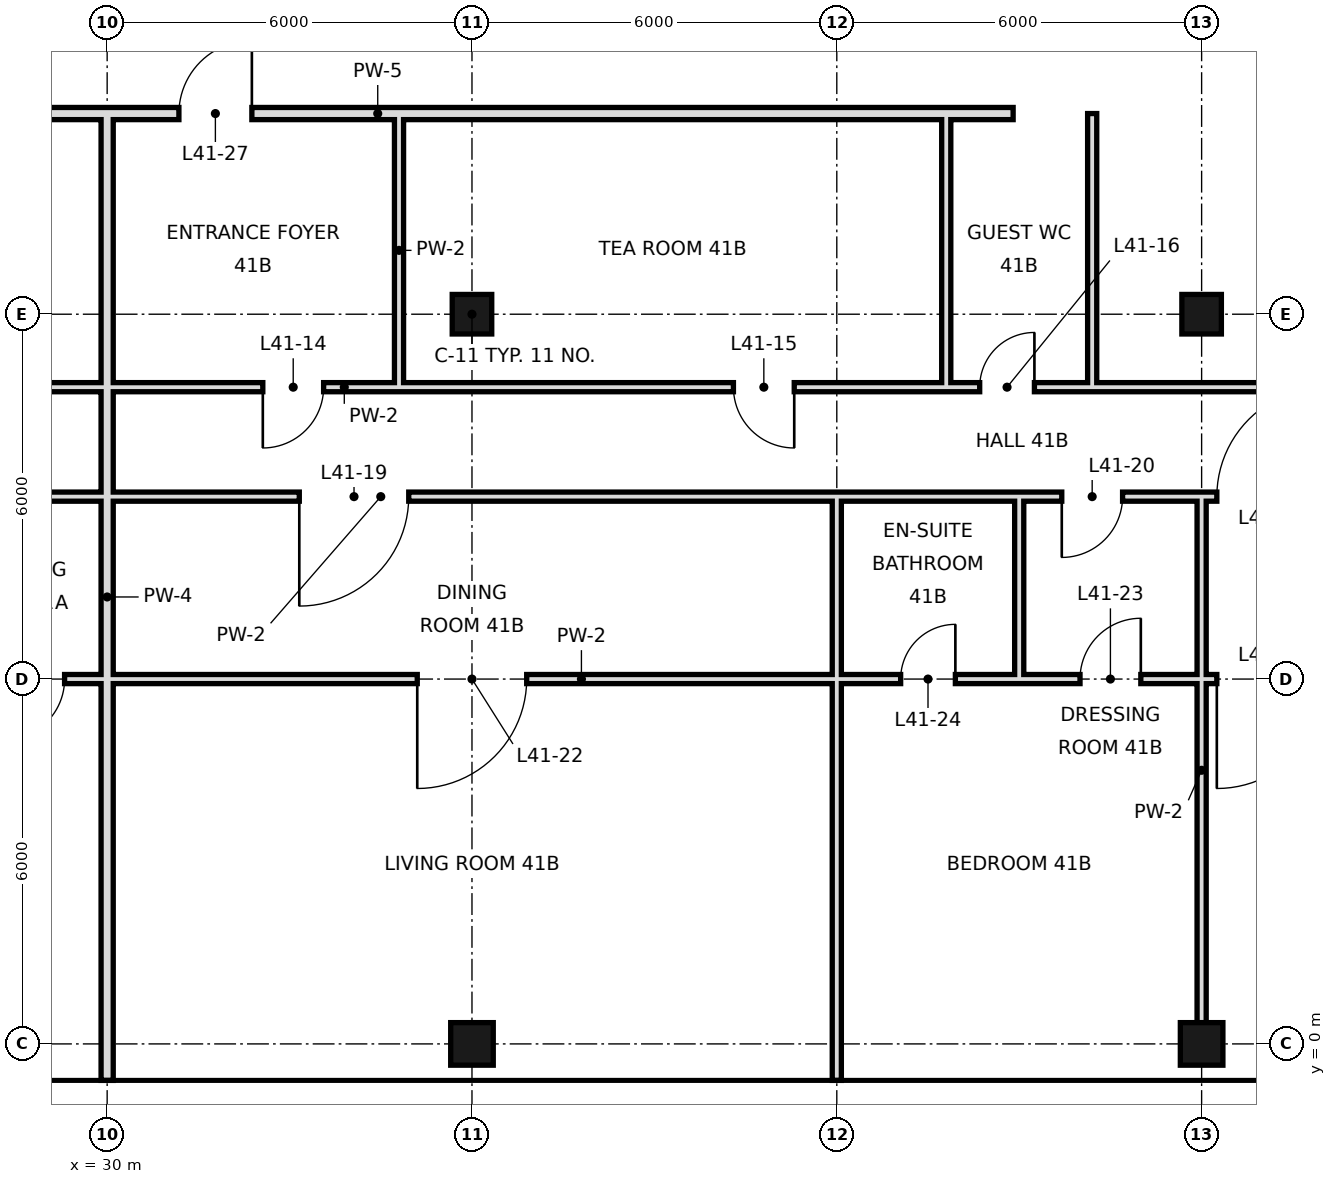
"""IFC4 building model, lengths in metres.
Left out: names, types, materials, properties, quantities, classifications, styles, units other than length and angle.
Written with IfcOpenShell. Run it as: python <this file> out.ifc"""

import sys

from ifc_helpers import new_model, si_unit, direction, frame, frame_2d, origin, origin_2d, place, context, subcontext, project, spatial, rectangle, hollow_rectangle, extrude, element, fill, save


model = new_model("IFC4")
c1 = context("Model", 3, precision=1e-05, world=origin(), true_north=direction((0.0, 1.0)))
c2 = subcontext(c1, "Body", "Model", "MODEL_VIEW")
j1 = project(units=[si_unit("LENGTHUNIT", "METRE"), si_unit("PLANEANGLEUNIT", "RADIAN")], contexts=[c1])
p1 = place(None, origin())
s1 = spatial("IfcSite", under=j1, at=p1, CompositionType="ELEMENT")
p2 = place(p1, origin())
s2 = spatial("IfcBuilding", under=s1, at=p2, CompositionType="ELEMENT")
p3 = place(p2, frame((0.0, 0.0, 178.0)))
s3 = spatial("IfcBuildingStorey", under=s2, at=p3, CompositionType="ELEMENT", Elevation=178.0)
p4 = place(p3, frame((36.0, 0.0, 0.0), z_axis=(0.0, 0.0, 1.0), x_axis=(1.0, 0.0, 0.0)))
e1 = element("IfcColumn", 1, at=p4, inside=s3, PredefinedType="COLUMN", context=c2, shape_type="SweptSolid", body=[
    extrude(hollow_rectangle(XDim=0.7, YDim=0.7, WallThickness=0.036, at=origin_2d()), origin(), (0.0, 0.0, 1.0), 3.6),
])
p5 = place(p3, frame((36.0, 12.0, 0.0), z_axis=(0.0, 0.0, 1.0), x_axis=(1.0, 0.0, 0.0)))
e2 = element("IfcColumn", 2, at=p5, inside=s3, PredefinedType="COLUMN", context=c2, shape_type="SweptSolid", body=[
    extrude(hollow_rectangle(XDim=0.65, YDim=0.65, WallThickness=0.032, at=origin_2d()), origin(), (0.0, 0.0, 1.0), 3.6),
])
p6 = place(p3, frame((48.0, 0.0, 0.0), z_axis=(0.0, 0.0, 1.0), x_axis=(1.0, 0.0, 0.0)))
e3 = element("IfcColumn", 3, at=p6, inside=s3, PredefinedType="COLUMN", context=c2, shape_type="SweptSolid", body=[
    extrude(hollow_rectangle(XDim=0.7, YDim=0.7, WallThickness=0.036, at=origin_2d()), origin(), (0.0, 0.0, 1.0), 3.6),
])
p7 = place(p3, frame((48.0, 12.0, 0.0), z_axis=(0.0, 0.0, 1.0), x_axis=(1.0, 0.0, 0.0)))
e4 = element("IfcColumn", 4, at=p7, inside=s3, PredefinedType="COLUMN", context=c2, shape_type="SweptSolid", body=[
    extrude(hollow_rectangle(XDim=0.65, YDim=0.65, WallThickness=0.032, at=origin_2d()), origin(), (0.0, 0.0, 1.0), 3.6),
])
p8 = place(p3, frame((30.0, -0.6, 0.0), z_axis=(0.0, 0.0, 1.0), x_axis=(0.0, 1.0, 0.0)))
e5 = element("IfcWall", 5, at=p8, inside=s3, PredefinedType="SOLIDWALL", context=c2, shape_type="SweptSolid", body=[
    extrude(rectangle(XDim=15.9, YDim=0.2, at=frame_2d((7.95, 0.0))), origin(), (0.0, 0.0, 1.0), 2.72),
])
p9 = place(p3, frame((34.8, 10.8, 0.0), z_axis=(0.0, 0.0, 1.0), x_axis=(0.0, 1.0, 0.0)))
e6 = element("IfcWall", 6, at=p9, inside=s3, PredefinedType="PARTITIONING", context=c2, shape_type="SweptSolid", body=[
    extrude(rectangle(XDim=4.5, YDim=0.15, at=frame_2d((2.25, 0.0))), origin(), (0.0, 0.0, 1.0), 3.42),
])
p10 = place(p3, frame((42.0, -0.6, 0.0), z_axis=(0.0, 0.0, 1.0), x_axis=(0.0, 1.0, 0.0)))
e7 = element("IfcWall", 7, at=p10, inside=s3, PredefinedType="PARTITIONING", context=c2, shape_type="SweptSolid", body=[
    extrude(rectangle(XDim=6.6, YDim=0.15, at=frame_2d((3.3, 0.0))), origin(), (0.0, 0.0, 1.0), 2.72),
])
p11 = place(p3, frame((42.0, 6.0, 0.0), z_axis=(0.0, 0.0, 1.0), x_axis=(0.0, 1.0, 0.0)))
e8 = element("IfcWall", 8, at=p11, inside=s3, PredefinedType="PARTITIONING", context=c2, shape_type="SweptSolid", body=[
    extrude(rectangle(XDim=3.0, YDim=0.15, at=frame_2d((1.5, 0.0))), origin(), (0.0, 0.0, 1.0), 2.72),
])
p12 = place(p3, frame((43.8, 10.8, 0.0), z_axis=(0.0, 0.0, 1.0), x_axis=(0.0, 1.0, 0.0)))
e9 = element("IfcWall", 9, at=p12, inside=s3, PredefinedType="PARTITIONING", context=c2, shape_type="SweptSolid", body=[
    extrude(rectangle(XDim=4.5, YDim=0.15, at=frame_2d((2.25, 0.0))), origin(), (0.0, 0.0, 1.0), 3.42),
])
p13 = place(p3, frame((45.0, 6.0, 0.0), z_axis=(0.0, 0.0, 1.0), x_axis=(0.0, 1.0, 0.0)))
e10 = element("IfcWall", 10, at=p13, inside=s3, PredefinedType="PARTITIONING", context=c2, shape_type="SweptSolid", body=[
    extrude(rectangle(XDim=3.0, YDim=0.15, at=frame_2d((1.5, 0.0))), origin(), (0.0, 0.0, 1.0), 3.42),
])
p14 = place(p3, frame((46.2, 10.8, 0.0), z_axis=(0.0, 0.0, 1.0), x_axis=(0.0, 1.0, 0.0)))
e11 = element("IfcWall", 11, at=p14, inside=s3, PredefinedType="PARTITIONING", context=c2, shape_type="SweptSolid", body=[
    extrude(rectangle(XDim=4.5, YDim=0.15, at=frame_2d((2.25, 0.0))), origin(), (0.0, 0.0, 1.0), 3.42),
])
p15 = place(p3, frame((48.0, 0.0, 0.0), z_axis=(0.0, 0.0, 1.0), x_axis=(0.0, 1.0, 0.0)))
e12 = element("IfcWall", 12, at=p15, inside=s3, PredefinedType="PARTITIONING", context=c2, shape_type="SweptSolid", body=[
    extrude(rectangle(XDim=9.0, YDim=0.15, at=frame_2d((4.5, 0.0))), origin(), (0.0, 0.0, 1.0), 2.72),
])
p16 = place(p3, frame((24.0, 10.8, 0.0), z_axis=(0.0, 0.0, 1.0), x_axis=(1.0, 0.0, 0.0)))
e13 = element("IfcWall", 13, at=p16, inside=s3, PredefinedType="PARTITIONING", context=c2, shape_type="SweptSolid", body=[
    extrude(rectangle(XDim=19.8, YDim=0.15, at=frame_2d((9.9, 0.0))), origin(), (0.0, 0.0, 1.0), 3.42),
])
p17 = place(p16, frame((2.5, 0.0, 0.0)))
e14 = element("IfcOpeningElement", 14, at=p17, cuts=e13, PredefinedType="OPENING", context=c2, shape_type="SweptSolid", body=[
    extrude(rectangle(XDim=1.0, YDim=2.4, at=frame_2d((0.5, 1.2))), frame((0.0, 0.085, 0.0), z_axis=(0.0, -1.0, 0.0), x_axis=(1.0, 0.0, 0.0)), (0.0, 0.0, 1.0), 0.17),
])
p18 = place(p16, frame((8.56, 0.0, 0.0)))
e15 = element("IfcOpeningElement", 15, at=p18, cuts=e13, PredefinedType="OPENING", context=c2, shape_type="SweptSolid", body=[
    extrude(rectangle(XDim=1.0, YDim=2.4, at=frame_2d((0.5, 1.2))), frame((0.0, 0.085, 0.0), z_axis=(0.0, -1.0, 0.0), x_axis=(1.0, 0.0, 0.0)), (0.0, 0.0, 1.0), 0.17),
])
p19 = place(p16, frame((16.3, 0.0, 0.0)))
e16 = element("IfcOpeningElement", 16, at=p19, cuts=e13, PredefinedType="OPENING", context=c2, shape_type="SweptSolid", body=[
    extrude(rectangle(XDim=1.0, YDim=2.4, at=frame_2d((0.5, 1.2))), frame((0.0, 0.085, 0.0), z_axis=(0.0, -1.0, 0.0), x_axis=(1.0, 0.0, 0.0)), (0.0, 0.0, 1.0), 0.17),
])
p20 = place(p3, frame((46.2, 10.8, 0.0), z_axis=(0.0, 0.0, 1.0), x_axis=(1.0, 0.0, 0.0)))
e17 = element("IfcWall", 17, at=p20, inside=s3, PredefinedType="PARTITIONING", context=c2, shape_type="SweptSolid", body=[
    extrude(rectangle(XDim=9.0, YDim=0.15, at=frame_2d((4.5, 0.0))), origin(), (0.0, 0.0, 1.0), 3.42),
])
p21 = place(p20, frame((5.5, 0.0, 0.0)))
e18 = element("IfcOpeningElement", 18, at=p21, cuts=e17, PredefinedType="OPENING", context=c2, shape_type="SweptSolid", body=[
    extrude(rectangle(XDim=1.0, YDim=2.4, at=frame_2d((0.5, 1.2))), frame((0.0, 0.085, 0.0), z_axis=(0.0, -1.0, 0.0), x_axis=(1.0, 0.0, 0.0)), (0.0, 0.0, 1.0), 0.17),
])
p22 = place(p3, frame((43.8, 10.8, 0.0), z_axis=(0.0, 0.0, 1.0), x_axis=(1.0, 0.0, 0.0)))
e19 = element("IfcWall", 19, at=p22, inside=s3, PredefinedType="PARTITIONING", context=c2, shape_type="SweptSolid", body=[
    extrude(rectangle(XDim=2.4, YDim=0.15, at=frame_2d((1.2, 0.0))), origin(), (0.0, 0.0, 1.0), 3.42),
])
p23 = place(p22, frame((0.55, 0.0, 0.0)))
e20 = element("IfcOpeningElement", 20, at=p23, cuts=e19, PredefinedType="OPENING", context=c2, shape_type="SweptSolid", body=[
    extrude(rectangle(XDim=0.9, YDim=2.4, at=frame_2d((0.45, 1.2))), frame((0.0, 0.085, 0.0), z_axis=(0.0, -1.0, 0.0), x_axis=(1.0, 0.0, 0.0)), (0.0, 0.0, 1.0), 0.17),
])
p24 = place(p3, frame((24.0, 15.3, 0.0), z_axis=(0.0, 0.0, 1.0), x_axis=(1.0, 0.0, 0.0)))
e21 = element("IfcWall", 21, at=p24, inside=s3, PredefinedType="SOLIDWALL", context=c2, shape_type="SweptSolid", body=[
    extrude(rectangle(XDim=20.9, YDim=0.2, at=frame_2d((10.45, 0.0))), origin(), (0.0, 0.0, 1.0), 2.72),
])
p25 = place(p24, frame((3.26, 0.0, 0.0)))
e22 = element("IfcOpeningElement", 22, at=p25, cuts=e21, PredefinedType="OPENING", context=c2, shape_type="SweptSolid", body=[
    extrude(rectangle(XDim=1.2, YDim=2.4, at=frame_2d((0.6, 1.2))), frame((0.0, 0.11, 0.0), z_axis=(0.0, -1.0, 0.0), x_axis=(1.0, 0.0, 0.0)), (0.0, 0.0, 1.0), 0.22),
])
p26 = place(p24, frame((7.18, 0.0, 0.0)))
e23 = element("IfcOpeningElement", 23, at=p26, cuts=e21, PredefinedType="OPENING", context=c2, shape_type="SweptSolid", body=[
    extrude(rectangle(XDim=1.2, YDim=2.4, at=frame_2d((0.6, 1.2))), frame((0.0, 0.11, 0.0), z_axis=(0.0, -1.0, 0.0), x_axis=(1.0, 0.0, 0.0)), (0.0, 0.0, 1.0), 0.22),
])
p27 = place(p3, frame((27.0, 6.0, 0.0), z_axis=(0.0, 0.0, 1.0), x_axis=(1.0, 0.0, 0.0)))
e24 = element("IfcWall", 24, at=p27, inside=s3, PredefinedType="PARTITIONING", context=c2, shape_type="SweptSolid", body=[
    extrude(rectangle(XDim=15.0, YDim=0.15, at=frame_2d((7.5, 0.0))), origin(), (0.0, 0.0, 1.0), 2.97),
])
p28 = place(p27, frame((1.3, 0.0, 0.0)))
e25 = element("IfcOpeningElement", 25, at=p28, cuts=e24, PredefinedType="OPENING", context=c2, shape_type="SweptSolid", body=[
    extrude(rectangle(XDim=1.0, YDim=2.4, at=frame_2d((0.5, 1.2))), frame((0.0, 0.085, 0.0), z_axis=(0.0, -1.0, 0.0), x_axis=(1.0, 0.0, 0.0)), (0.0, 0.0, 1.0), 0.17),
])
p29 = place(p27, frame((8.1, 0.0, 0.0)))
e26 = element("IfcOpeningElement", 26, at=p29, cuts=e24, PredefinedType="OPENING", context=c2, shape_type="SweptSolid", body=[
    extrude(rectangle(XDim=1.8, YDim=2.4, at=frame_2d((0.9, 1.2))), frame((0.0, 0.085, 0.0), z_axis=(0.0, -1.0, 0.0), x_axis=(1.0, 0.0, 0.0)), (0.0, 0.0, 1.0), 0.17),
])
p30 = place(p3, frame((45.0, 6.0, 0.0), z_axis=(0.0, 0.0, 1.0), x_axis=(1.0, 0.0, 0.0)))
e27 = element("IfcWall", 27, at=p30, inside=s3, PredefinedType="PARTITIONING", context=c2, shape_type="SweptSolid", body=[
    extrude(rectangle(XDim=15.0, YDim=0.15, at=frame_2d((7.5, 0.0))), origin(), (0.0, 0.0, 1.0), 2.72),
])
p31 = place(p30, frame((1.0, 0.0, 0.0)))
e28 = element("IfcOpeningElement", 28, at=p31, cuts=e27, PredefinedType="OPENING", context=c2, shape_type="SweptSolid", body=[
    extrude(rectangle(XDim=1.0, YDim=2.4, at=frame_2d((0.5, 1.2))), frame((0.0, 0.085, 0.0), z_axis=(0.0, -1.0, 0.0), x_axis=(1.0, 0.0, 0.0)), (0.0, 0.0, 1.0), 0.17),
])
p32 = place(p30, frame((3.25, 0.0, 0.0)))
e29 = element("IfcOpeningElement", 29, at=p32, cuts=e27, PredefinedType="OPENING", context=c2, shape_type="SweptSolid", body=[
    extrude(rectangle(XDim=1.8, YDim=2.4, at=frame_2d((0.9, 1.2))), frame((0.0, 0.085, 0.0), z_axis=(0.0, -1.0, 0.0), x_axis=(1.0, 0.0, 0.0)), (0.0, 0.0, 1.0), 0.17),
])
p33 = place(p3, frame((42.0, 6.0, 0.0), z_axis=(0.0, 0.0, 1.0), x_axis=(1.0, 0.0, 0.0)))
e30 = element("IfcWall", 30, at=p33, inside=s3, PredefinedType="PARTITIONING", context=c2, shape_type="SweptSolid", body=[
    extrude(rectangle(XDim=3.0, YDim=0.15, at=frame_2d((1.5, 0.0))), origin(), (0.0, 0.0, 1.0), 2.97),
])
p34 = place(p33, frame((1.05, 0.0, 0.0)))
e31 = element("IfcOpeningElement", 31, at=p34, cuts=e30, PredefinedType="OPENING", context=c2, shape_type="SweptSolid", body=[
    extrude(rectangle(XDim=0.9, YDim=2.4, at=frame_2d((0.45, 1.2))), frame((0.0, 0.085, 0.0), z_axis=(0.0, -1.0, 0.0), x_axis=(1.0, 0.0, 0.0)), (0.0, 0.0, 1.0), 0.17),
])
p35 = place(p3, frame((27.0, 9.0, 0.0), z_axis=(0.0, 0.0, 1.0), x_axis=(1.0, 0.0, 0.0)))
e32 = element("IfcWall", 32, at=p35, inside=s3, PredefinedType="PARTITIONING", context=c2, shape_type="SweptSolid", body=[
    extrude(rectangle(XDim=15.0, YDim=0.15, at=frame_2d((7.5, 0.0))), origin(), (0.0, 0.0, 1.0), 3.42),
])
p36 = place(p35, frame((1.0, 0.0, 0.0)))
e33 = element("IfcOpeningElement", 33, at=p36, cuts=e32, PredefinedType="OPENING", context=c2, shape_type="SweptSolid", body=[
    extrude(rectangle(XDim=1.0, YDim=2.4, at=frame_2d((0.5, 1.2))), frame((0.0, 0.085, 0.0), z_axis=(0.0, -1.0, 0.0), x_axis=(1.0, 0.0, 0.0)), (0.0, 0.0, 1.0), 0.17),
])
p37 = place(p35, frame((6.16, 0.0, 0.0)))
e34 = element("IfcOpeningElement", 34, at=p37, cuts=e32, PredefinedType="OPENING", context=c2, shape_type="SweptSolid", body=[
    extrude(rectangle(XDim=1.8, YDim=2.4, at=frame_2d((0.9, 1.2))), frame((0.0, 0.085, 0.0), z_axis=(0.0, -1.0, 0.0), x_axis=(1.0, 0.0, 0.0)), (0.0, 0.0, 1.0), 0.17),
])
p38 = place(p3, frame((45.0, 9.0, 0.0), z_axis=(0.0, 0.0, 1.0), x_axis=(1.0, 0.0, 0.0)))
e35 = element("IfcWall", 35, at=p38, inside=s3, PredefinedType="PARTITIONING", context=c2, shape_type="SweptSolid", body=[
    extrude(rectangle(XDim=15.6, YDim=0.15, at=frame_2d((7.8, 0.0))), origin(), (0.0, 0.0, 1.0), 3.42),
])
p39 = place(p38, frame((0.7, 0.0, 0.0)))
e36 = element("IfcOpeningElement", 36, at=p39, cuts=e35, PredefinedType="OPENING", context=c2, shape_type="SweptSolid", body=[
    extrude(rectangle(XDim=1.0, YDim=2.4, at=frame_2d((0.5, 1.2))), frame((0.0, 0.085, 0.0), z_axis=(0.0, -1.0, 0.0), x_axis=(1.0, 0.0, 0.0)), (0.0, 0.0, 1.0), 0.17),
])
p40 = place(p38, frame((3.25, 0.0, 0.0)))
e37 = element("IfcOpeningElement", 37, at=p40, cuts=e35, PredefinedType="OPENING", context=c2, shape_type="SweptSolid", body=[
    extrude(rectangle(XDim=1.8, YDim=2.4, at=frame_2d((0.9, 1.2))), frame((0.0, 0.085, 0.0), z_axis=(0.0, -1.0, 0.0), x_axis=(1.0, 0.0, 0.0)), (0.0, 0.0, 1.0), 0.17),
])
p41 = place(p3, frame((42.0, 9.0, 0.0), z_axis=(0.0, 0.0, 1.0), x_axis=(1.0, 0.0, 0.0)))
e38 = element("IfcWall", 38, at=p41, inside=s3, PredefinedType="PARTITIONING", context=c2, shape_type="SweptSolid", body=[
    extrude(rectangle(XDim=3.0, YDim=0.15, at=frame_2d((1.5, 0.0))), origin(), (0.0, 0.0, 1.0), 3.42),
])
p42 = place(p28, frame((1.0, 0.0, 0.0), z_axis=(0.0, 0.0, 1.0), x_axis=(-1.0, 0.0, 0.0)))
e39 = element("IfcDoor", 39, at=p42, inside=s3, OperationType="SINGLE_SWING_RIGHT", PredefinedType="DOOR", context=c2, shape_type="SweptSolid", body=[
    extrude(rectangle(XDim=1.0, YDim=2.4, at=frame_2d((0.5, 1.2))), frame((0.0, 0.025, 0.0), z_axis=(0.0, -1.0, 0.0), x_axis=(1.0, 0.0, 0.0)), (0.0, 0.0, 1.0), 0.05),
])
fill(e25, e39)
p43 = place(p18, frame((1.0, 0.0, 0.0), z_axis=(0.0, 0.0, 1.0), x_axis=(-1.0, 0.0, 0.0)))
e40 = element("IfcDoor", 40, at=p43, inside=s3, OperationType="SINGLE_SWING_RIGHT", PredefinedType="DOOR", context=c2, shape_type="SweptSolid", body=[
    extrude(rectangle(XDim=1.0, YDim=2.4, at=frame_2d((0.5, 1.2))), frame((0.0, 0.025, 0.0), z_axis=(0.0, -1.0, 0.0), x_axis=(1.0, 0.0, 0.0)), (0.0, 0.0, 1.0), 0.05),
])
fill(e15, e40)
p44 = place(p19, origin())
e41 = element("IfcDoor", 41, at=p44, inside=s3, OperationType="SINGLE_SWING_RIGHT", PredefinedType="DOOR", context=c2, shape_type="SweptSolid", body=[
    extrude(rectangle(XDim=1.0, YDim=2.4, at=frame_2d((0.5, 1.2))), frame((0.0, 0.025, 0.0), z_axis=(0.0, -1.0, 0.0), x_axis=(1.0, 0.0, 0.0)), (0.0, 0.0, 1.0), 0.05),
])
fill(e16, e41)
p45 = place(p23, frame((0.9, 0.0, 0.0), z_axis=(0.0, 0.0, 1.0), x_axis=(-1.0, 0.0, 0.0)))
e42 = element("IfcDoor", 42, at=p45, inside=s3, OperationType="SINGLE_SWING_LEFT", PredefinedType="DOOR", context=c2, shape_type="SweptSolid", body=[
    extrude(rectangle(XDim=0.9, YDim=2.4, at=frame_2d((0.45, 1.2))), frame((0.0, 0.025, 0.0), z_axis=(0.0, -1.0, 0.0), x_axis=(1.0, 0.0, 0.0)), (0.0, 0.0, 1.0), 0.05),
])
fill(e20, e42)
p46 = place(p37, frame((1.8, 0.0, 0.0), z_axis=(0.0, 0.0, 1.0), x_axis=(-1.0, 0.0, 0.0)))
e43 = element("IfcDoor", 43, at=p46, inside=s3, OperationType="SINGLE_SWING_RIGHT", PredefinedType="DOOR", context=c2, shape_type="SweptSolid", body=[
    extrude(rectangle(XDim=1.8, YDim=2.4, at=frame_2d((0.9, 1.2))), frame((0.0, 0.025, 0.0), z_axis=(0.0, -1.0, 0.0), x_axis=(1.0, 0.0, 0.0)), (0.0, 0.0, 1.0), 0.05),
])
fill(e34, e43)
p47 = place(p39, frame((1.0, 0.0, 0.0), z_axis=(0.0, 0.0, 1.0), x_axis=(-1.0, 0.0, 0.0)))
e44 = element("IfcDoor", 44, at=p47, inside=s3, OperationType="SINGLE_SWING_RIGHT", PredefinedType="DOOR", context=c2, shape_type="SweptSolid", body=[
    extrude(rectangle(XDim=1.0, YDim=2.4, at=frame_2d((0.5, 1.2))), frame((0.0, 0.025, 0.0), z_axis=(0.0, -1.0, 0.0), x_axis=(1.0, 0.0, 0.0)), (0.0, 0.0, 1.0), 0.05),
])
fill(e36, e44)
p48 = place(p40, frame((1.8, 0.0, 0.0), z_axis=(0.0, 0.0, 1.0), x_axis=(-1.0, 0.0, 0.0)))
e45 = element("IfcDoor", 45, at=p48, inside=s3, OperationType="SINGLE_SWING_LEFT", PredefinedType="DOOR", context=c2, shape_type="SweptSolid", body=[
    extrude(rectangle(XDim=1.8, YDim=2.4, at=frame_2d((0.9, 1.2))), frame((0.0, 0.025, 0.0), z_axis=(0.0, -1.0, 0.0), x_axis=(1.0, 0.0, 0.0)), (0.0, 0.0, 1.0), 0.05),
])
fill(e37, e45)
p49 = place(p29, frame((1.8, 0.0, 0.0), z_axis=(0.0, 0.0, 1.0), x_axis=(-1.0, 0.0, 0.0)))
e46 = element("IfcDoor", 46, at=p49, inside=s3, OperationType="SINGLE_SWING_RIGHT", PredefinedType="DOOR", context=c2, shape_type="SweptSolid", body=[
    extrude(rectangle(XDim=1.8, YDim=2.4, at=frame_2d((0.9, 1.2))), frame((0.0, 0.025, 0.0), z_axis=(0.0, -1.0, 0.0), x_axis=(1.0, 0.0, 0.0)), (0.0, 0.0, 1.0), 0.05),
])
fill(e26, e46)
p50 = place(p31, frame((1.0, 0.0, 0.0), z_axis=(0.0, 0.0, 1.0), x_axis=(-1.0, 0.0, 0.0)))
e47 = element("IfcDoor", 47, at=p50, inside=s3, OperationType="SINGLE_SWING_LEFT", PredefinedType="DOOR", context=c2, shape_type="SweptSolid", body=[
    extrude(rectangle(XDim=1.0, YDim=2.4, at=frame_2d((0.5, 1.2))), frame((0.0, 0.025, 0.0), z_axis=(0.0, -1.0, 0.0), x_axis=(1.0, 0.0, 0.0)), (0.0, 0.0, 1.0), 0.05),
])
fill(e28, e47)
p51 = place(p34, frame((0.9, 0.0, 0.0), z_axis=(0.0, 0.0, 1.0), x_axis=(-1.0, 0.0, 0.0)))
e48 = element("IfcDoor", 48, at=p51, inside=s3, OperationType="SINGLE_SWING_LEFT", PredefinedType="DOOR", context=c2, shape_type="SweptSolid", body=[
    extrude(rectangle(XDim=0.9, YDim=2.4, at=frame_2d((0.45, 1.2))), frame((0.0, 0.025, 0.0), z_axis=(0.0, -1.0, 0.0), x_axis=(1.0, 0.0, 0.0)), (0.0, 0.0, 1.0), 0.05),
])
fill(e31, e48)
p52 = place(p32, frame((1.8, 0.0, 0.0), z_axis=(0.0, 0.0, 1.0), x_axis=(-1.0, 0.0, 0.0)))
e49 = element("IfcDoor", 49, at=p52, inside=s3, OperationType="SINGLE_SWING_RIGHT", PredefinedType="DOOR", context=c2, shape_type="SweptSolid", body=[
    extrude(rectangle(XDim=1.8, YDim=2.4, at=frame_2d((0.9, 1.2))), frame((0.0, 0.025, 0.0), z_axis=(0.0, -1.0, 0.0), x_axis=(1.0, 0.0, 0.0)), (0.0, 0.0, 1.0), 0.05),
])
fill(e29, e49)
p53 = place(p26, frame((1.2, 0.0, 0.0), z_axis=(0.0, 0.0, 1.0), x_axis=(-1.0, 0.0, 0.0)))
e50 = element("IfcDoor", 50, at=p53, inside=s3, OperationType="SINGLE_SWING_LEFT", PredefinedType="DOOR", context=c2, shape_type="SweptSolid", body=[
    extrude(rectangle(XDim=1.2, YDim=2.4, at=frame_2d((0.6, 1.2))), frame((0.0, 0.025, 0.0), z_axis=(0.0, -1.0, 0.0), x_axis=(1.0, 0.0, 0.0)), (0.0, 0.0, 1.0), 0.05),
])
fill(e23, e50)
save(model, sys.argv[1])
